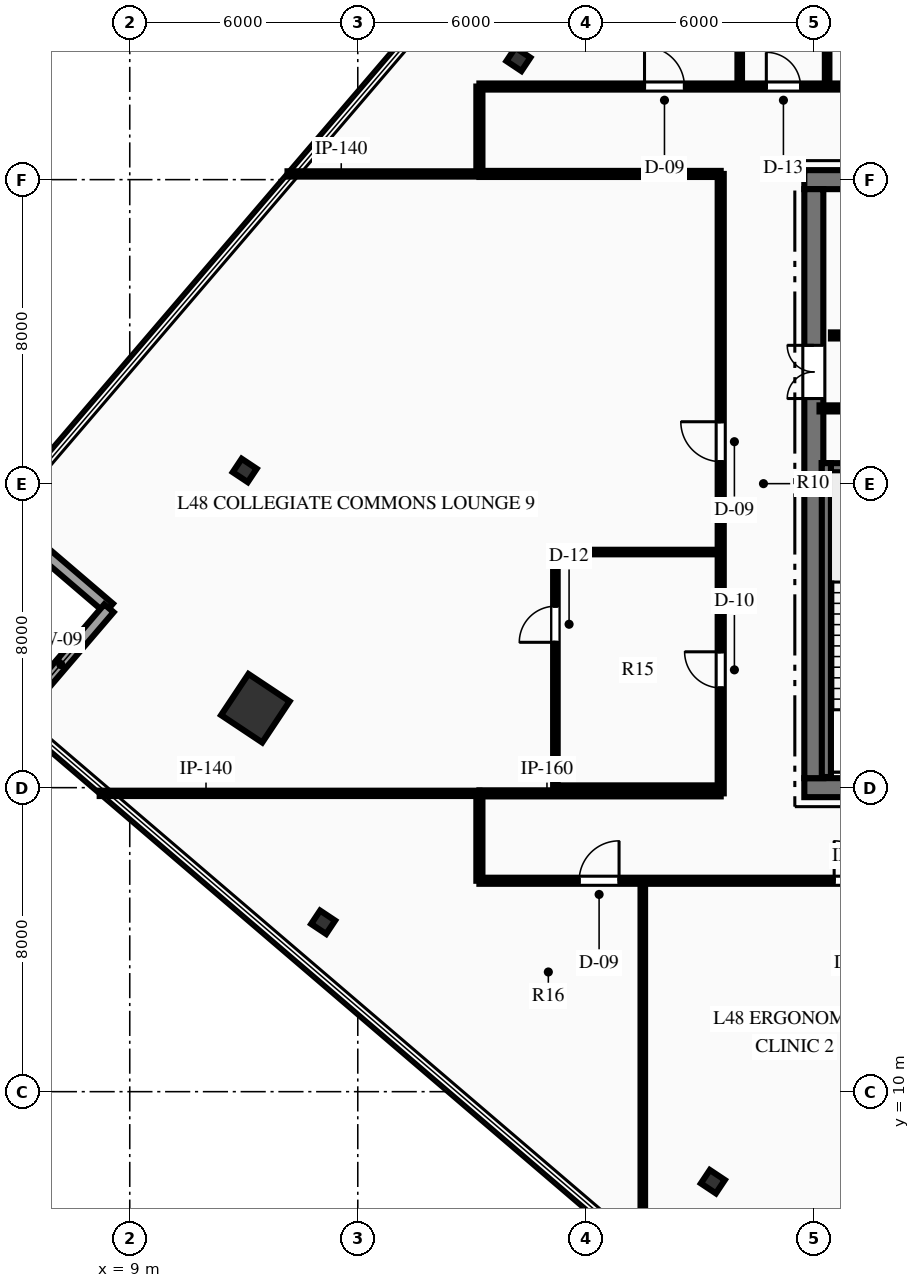
"""IFC4 building model, lengths in metres.
Left out: names, types, materials, properties, quantities, classifications, styles, units other than length and angle.
Written with IfcOpenShell. Run it as: python <this file> out.ifc"""

import sys

from ifc_helpers import new_model, si_unit, direction, frame, frame_2d, origin, origin_2d, place, context, subcontext, project, spatial, rectangle, hollow_rectangle, i_section, extrude, element, fill, save


model = new_model("IFC4")
c1 = context("Model", 3, precision=1e-05, world=origin(), true_north=direction((0.0, 1.0)))
c2 = subcontext(c1, "Body", "Model", "MODEL_VIEW")
j1 = project(units=[si_unit("LENGTHUNIT", "METRE"), si_unit("PLANEANGLEUNIT", "RADIAN")], contexts=[c1])
p1 = place(None, origin())
s1 = spatial("IfcSite", under=j1, at=p1, CompositionType="ELEMENT")
p2 = place(p1, origin())
s2 = spatial("IfcBuilding", under=s1, at=p2, CompositionType="ELEMENT")
p3 = place(p2, frame((0.0, 0.0, 193.95)))
s3 = spatial("IfcBuildingStorey", under=s2, at=p3, CompositionType="ELEMENT", Elevation=193.95)
p4 = place(p3, frame((26.75, 18.0, 0.0), z_axis=(0.0, 0.0, 1.0), x_axis=(1.0, 0.0, 0.0)))
e1 = element("IfcWall", 1, at=p4, inside=s3, PredefinedType="SHEAR", context=c2, shape_type="SweptSolid", body=[
    extrude(rectangle(XDim=18.5, YDim=0.5, at=frame_2d((9.25, 0.0))), origin(), (0.0, 0.0, 1.0), 4.5),
])
p5 = place(p4, frame((7.35, 0.0, 0.0)))
e2 = element("IfcOpeningElement", 2, at=p5, cuts=e1, PredefinedType="OPENING", context=c2, shape_type="SweptSolid", body=[
    extrude(rectangle(XDim=1.1, YDim=2.15, at=frame_2d((0.55, 1.075))), frame((0.0, 0.26, 0.0), z_axis=(0.0, -1.0, 0.0), x_axis=(1.0, 0.0, 0.0)), (0.0, 0.0, 1.0), 0.52),
])
p6 = place(p4, frame((10.05, 0.0, 0.0)))
e3 = element("IfcOpeningElement", 3, at=p6, cuts=e1, PredefinedType="OPENING", context=c2, shape_type="SweptSolid", body=[
    extrude(rectangle(XDim=1.1, YDim=2.15, at=frame_2d((0.55, 1.075))), frame((0.0, 0.26, 0.0), z_axis=(0.0, -1.0, 0.0), x_axis=(1.0, 0.0, 0.0)), (0.0, 0.0, 1.0), 0.52),
])
p7 = place(p3, frame((26.75, 34.0, 0.0), z_axis=(0.0, 0.0, 1.0), x_axis=(1.0, 0.0, 0.0)))
e4 = element("IfcWall", 4, at=p7, inside=s3, PredefinedType="SHEAR", context=c2, shape_type="SweptSolid", body=[
    extrude(rectangle(XDim=18.5, YDim=0.5, at=frame_2d((9.25, 0.0))), origin(), (0.0, 0.0, 1.0), 4.5),
])
p8 = place(p7, frame((13.935, 0.0, 0.0)))
e5 = element("IfcOpeningElement", 5, at=p8, cuts=e4, PredefinedType="OPENING", context=c2, shape_type="SweptSolid", body=[
    extrude(rectangle(XDim=1.1, YDim=2.15, at=frame_2d((0.55, 1.075))), frame((0.0, 0.26, 0.0), z_axis=(0.0, -1.0, 0.0), x_axis=(1.0, 0.0, 0.0)), (0.0, 0.0, 1.0), 0.52),
])
p9 = place(p7, frame((16.185, 0.0, 0.0)))
e6 = element("IfcOpeningElement", 6, at=p9, cuts=e4, PredefinedType="OPENING", context=c2, shape_type="SweptSolid", body=[
    extrude(rectangle(XDim=1.1, YDim=2.15, at=frame_2d((0.55, 1.075))), frame((0.0, 0.26, 0.0), z_axis=(0.0, -1.0, 0.0), x_axis=(1.0, 0.0, 0.0)), (0.0, 0.0, 1.0), 0.52),
])
p10 = place(p3, frame((27.0, 18.25, 0.0), z_axis=(0.0, 0.0, 1.0), x_axis=(0.0, 1.0, 0.0)))
e7 = element("IfcWall", 7, at=p10, inside=s3, PredefinedType="SHEAR", context=c2, shape_type="SweptSolid", body=[
    extrude(rectangle(XDim=15.5, YDim=0.5, at=frame_2d((7.75, 0.0))), origin(), (0.0, 0.0, 1.0), 4.5),
])
p11 = place(p10, frame((9.99, 0.0, 0.0)))
e8 = element("IfcOpeningElement", 8, at=p11, cuts=e7, PredefinedType="OPENING", context=c2, shape_type="SweptSolid", body=[
    extrude(rectangle(XDim=1.4, YDim=2.2, at=frame_2d((0.7, 1.1))), frame((0.0, 0.26, 0.0), z_axis=(0.0, -1.0, 0.0), x_axis=(1.0, 0.0, 0.0)), (0.0, 0.0, 1.0), 0.52),
])
p12 = place(p3, frame((27.21, 26.42, 0.0), z_axis=(0.0, 0.0, 1.0), x_axis=(1.0, 0.0, 0.0)))
e9 = element("IfcWall", 9, at=p12, inside=s3, PredefinedType="SHEAR", context=c2, shape_type="SweptSolid", body=[
    extrude(rectangle(XDim=3.98, YDim=0.24, at=frame_2d((1.99, 0.0))), origin(), (0.0, 0.0, 1.0), 4.5),
])
p13 = place(p3, frame((27.33, 18.28, 0.0), z_axis=(0.0, 0.0, 1.0), x_axis=(0.0, 1.0, 0.0)))
e10 = element("IfcWall", 10, at=p13, inside=s3, PredefinedType="SHEAR", context=c2, shape_type="SweptSolid", body=[
    extrude(rectangle(XDim=8.26, YDim=0.24, at=frame_2d((4.13, 0.0))), origin(), (0.0, 0.0, 1.0), 4.5),
])
p14 = place(p3, frame((12.305, 20.09, 0.0), z_axis=(0.0, 0.0, 1.0), x_axis=(0.554118199338, 0.832437998389, 0.0)))
e11 = element("IfcColumn", 11, at=p14, inside=s3, PredefinedType="COLUMN", context=c2, shape_type="SweptSolid", body=[
    extrude(hollow_rectangle(XDim=1.3, YDim=1.3, WallThickness=0.06, at=origin_2d()), origin(), (0.0, 0.0, 1.0), 4.5),
])
for number, where, z_axis, x_axis in (
    (12, (19.226, 37.166, 0.0), (0.0, 0.0, 1.0), (0.554, 0.832, 0.0)),
    (13, (12.025, 26.347, 0.0), (0.0, 0.0, 1.0), (0.554, 0.832, 0.0)),
    (14, (14.088, 14.458, 0.0), (0.0, 0.0, 1.0), (0.554, 0.832, 0.0)),
    (15, (24.343, 7.631, 0.0), (0.0, 0.0, 1.0), (0.554, 0.832, 0.0)),
):
    element("IfcColumn", number, at=place(p3, frame(where, z_axis=z_axis, x_axis=x_axis)), inside=s3, PredefinedType="COLUMN", context=c2, shape_type="SweptSolid", body=[
        extrude(i_section(OverallWidth=0.424, OverallDepth=0.474, WebThickness=0.048, FlangeThickness=0.077, at=origin_2d()), origin(), (0.0, 0.0, 1.0), 4.5),
    ])
p15 = place(p3, frame((8.453, 22.721, 0.0), z_axis=(0.0, 0.0, 1.0), x_axis=(-0.759844000319, 0.650105449276, 0.0)))
e16 = element("IfcWall", 16, at=p15, inside=s3, PredefinedType="STANDARD", context=c2, shape_type="SweptSolid", body=[
    extrude(rectangle(XDim=3.9, YDim=0.32, at=frame_2d((1.95, 0.0))), origin(), (0.0, 0.0, 1.0), 4.22),
])
p16 = place(p3, frame((5.917, 19.758, 0.0), z_axis=(0.0, 0.0, 1.0), x_axis=(0.650141590235, 0.759813077438, 0.0)))
e17 = element("IfcWall", 17, at=p16, inside=s3, PredefinedType="STANDARD", context=c2, shape_type="SweptSolid", body=[
    extrude(rectangle(XDim=3.9, YDim=0.32, at=frame_2d((1.95, 0.0))), origin(), (0.0, 0.0, 1.0), 4.22),
])
p17 = place(p16, frame((1.1, 0.0, 0.75)))
e18 = element("IfcOpeningElement", 18, at=p17, cuts=e17, PredefinedType="OPENING", context=c2, shape_type="SweptSolid", body=[
    extrude(rectangle(XDim=1.7, YDim=2.5, at=frame_2d((0.85, 1.25))), frame((0.0, 0.17, 0.0), z_axis=(0.0, -1.0, 0.0), x_axis=(1.0, 0.0, 0.0)), (0.0, 0.0, 1.0), 0.34),
])
p18 = place(p3, frame((27.15, 27.98, 0.0), z_axis=(0.0, 0.0, 1.0), x_axis=(1.0, 0.0, 0.0)))
e19 = element("IfcWall", 19, at=p18, inside=s3, PredefinedType="PARTITIONING", context=c2, shape_type="SweptSolid", body=[
    extrude(rectangle(XDim=4.05, YDim=0.16, at=frame_2d((2.025, 0.0))), origin(), (0.0, 0.0, 1.0), 4.22),
])
p19 = place(p18, frame((1.625, 0.0, 0.0)))
e20 = element("IfcOpeningElement", 20, at=p19, cuts=e19, PredefinedType="OPENING", context=c2, shape_type="SweptSolid", body=[
    extrude(rectangle(XDim=0.95, YDim=2.15, at=frame_2d((0.475, 1.075))), frame((0.0, 0.09, 0.0), z_axis=(0.0, -1.0, 0.0), x_axis=(1.0, 0.0, 0.0)), (0.0, 0.0, 1.0), 0.18),
])
p20 = place(p3, frame((27.45, 29.9, 0.0), z_axis=(0.0, 0.0, 1.0), x_axis=(1.0, 0.0, 0.0)))
e21 = element("IfcWall", 21, at=p20, inside=s3, PredefinedType="PARTITIONING", context=c2, shape_type="SweptSolid", body=[
    extrude(rectangle(XDim=4.43, YDim=0.16, at=frame_2d((2.215, 0.0))), origin(), (0.0, 0.0, 1.0), 4.22),
])
p21 = place(p20, frame((1.675, 0.0, 0.0)))
e22 = element("IfcOpeningElement", 22, at=p21, cuts=e21, PredefinedType="OPENING", context=c2, shape_type="SweptSolid", body=[
    extrude(rectangle(XDim=0.95, YDim=2.15, at=frame_2d((0.475, 1.075))), frame((0.0, 0.09, 0.0), z_axis=(0.0, -1.0, 0.0), x_axis=(1.0, 0.0, 0.0)), (0.0, 0.0, 1.0), 0.18),
])
p22 = place(p3, frame((18.2, 15.55, 0.0), z_axis=(0.0, 0.0, 1.0), x_axis=(1.0, 0.0, 0.0)))
e23 = element("IfcWall", 23, at=p22, inside=s3, PredefinedType="PARTITIONING", context=c2, shape_type="SweptSolid", body=[
    extrude(rectangle(XDim=35.6, YDim=0.16, at=frame_2d((17.8, 0.0))), origin(), (0.0, 0.0, 1.0), 3.599),
])
p23 = place(p22, frame((2.625, 0.0, 0.0)))
e24 = element("IfcOpeningElement", 24, at=p23, cuts=e23, PredefinedType="OPENING", context=c2, shape_type="SweptSolid", body=[
    extrude(rectangle(XDim=1.05, YDim=2.15, at=frame_2d((0.525, 1.075))), frame((0.0, 0.09, 0.0), z_axis=(0.0, -1.0, 0.0), x_axis=(1.0, 0.0, 0.0)), (0.0, 0.0, 1.0), 0.18),
])
p24 = place(p22, frame((9.335, 0.0, 0.0)))
e25 = element("IfcOpeningElement", 25, at=p24, cuts=e23, PredefinedType="OPENING", context=c2, shape_type="SweptSolid", body=[
    extrude(rectangle(XDim=1.05, YDim=2.15, at=frame_2d((0.525, 1.075))), frame((0.0, 0.09, 0.0), z_axis=(0.0, -1.0, 0.0), x_axis=(1.0, 0.0, 0.0)), (0.0, 0.0, 1.0), 0.18),
])
p25 = place(p22, frame((17.775, 0.0, 0.0)))
e26 = element("IfcOpeningElement", 26, at=p25, cuts=e23, PredefinedType="OPENING", context=c2, shape_type="SweptSolid", body=[
    extrude(rectangle(XDim=1.05, YDim=2.15, at=frame_2d((0.525, 1.075))), frame((0.0, 0.09, 0.0), z_axis=(0.0, -1.0, 0.0), x_axis=(1.0, 0.0, 0.0)), (0.0, 0.0, 1.0), 0.18),
])
p26 = place(p22, frame((26.055, 0.0, 0.0)))
e27 = element("IfcOpeningElement", 27, at=p26, cuts=e23, PredefinedType="OPENING", context=c2, shape_type="SweptSolid", body=[
    extrude(rectangle(XDim=1.05, YDim=2.15, at=frame_2d((0.525, 1.075))), frame((0.0, 0.09, 0.0), z_axis=(0.0, -1.0, 0.0), x_axis=(1.0, 0.0, 0.0)), (0.0, 0.0, 1.0), 0.18),
])
p27 = place(p22, frame((32.265, 0.0, 0.0)))
e28 = element("IfcOpeningElement", 28, at=p27, cuts=e23, PredefinedType="OPENING", context=c2, shape_type="SweptSolid", body=[
    extrude(rectangle(XDim=1.05, YDim=2.15, at=frame_2d((0.525, 1.075))), frame((0.0, 0.09, 0.0), z_axis=(0.0, -1.0, 0.0), x_axis=(1.0, 0.0, 0.0)), (0.0, 0.0, 1.0), 0.18),
])
p28 = place(p3, frame((18.2, 17.85, 0.0), z_axis=(0.0, 0.0, 1.0), x_axis=(1.0, 0.0, 0.0)))
e29 = element("IfcWall", 29, at=p28, inside=s3, PredefinedType="PARTITIONING", context=c2, shape_type="SweptSolid", body=[
    extrude(rectangle(XDim=6.35, YDim=0.16, at=frame_2d((3.175, 0.0))), origin(), (0.0, 0.0, 1.0), 4.22),
])
p29 = place(p3, frame((18.2, 36.45, 0.0), z_axis=(0.0, 0.0, 1.0), x_axis=(1.0, 0.0, 0.0)))
e30 = element("IfcWall", 30, at=p29, inside=s3, PredefinedType="PARTITIONING", context=c2, shape_type="SweptSolid", body=[
    extrude(rectangle(XDim=35.6, YDim=0.16, at=frame_2d((17.8, 0.0))), origin(), (0.0, 0.0, 1.0), 3.599),
])
p30 = place(p29, frame((7.55, 0.0, 0.0)))
e31 = element("IfcOpeningElement", 31, at=p30, cuts=e30, PredefinedType="OPENING", context=c2, shape_type="SweptSolid", body=[
    extrude(rectangle(XDim=0.9, YDim=2.15, at=frame_2d((0.45, 1.075))), frame((0.0, 0.09, 0.0), z_axis=(0.0, -1.0, 0.0), x_axis=(1.0, 0.0, 0.0)), (0.0, 0.0, 1.0), 0.18),
])
p31 = place(p29, frame((9.85, 0.0, 0.0)))
e32 = element("IfcOpeningElement", 32, at=p31, cuts=e30, PredefinedType="OPENING", context=c2, shape_type="SweptSolid", body=[
    extrude(rectangle(XDim=0.9, YDim=2.15, at=frame_2d((0.45, 1.075))), frame((0.0, 0.09, 0.0), z_axis=(0.0, -1.0, 0.0), x_axis=(1.0, 0.0, 0.0)), (0.0, 0.0, 1.0), 0.18),
])
p32 = place(p29, frame((12.1, 0.0, 0.0)))
e33 = element("IfcOpeningElement", 33, at=p32, cuts=e30, PredefinedType="OPENING", context=c2, shape_type="SweptSolid", body=[
    extrude(rectangle(XDim=1.0, YDim=2.15, at=frame_2d((0.5, 1.075))), frame((0.0, 0.09, 0.0), z_axis=(0.0, -1.0, 0.0), x_axis=(1.0, 0.0, 0.0)), (0.0, 0.0, 1.0), 0.18),
])
p33 = place(p29, frame((4.345, 0.0, 0.0)))
e34 = element("IfcOpeningElement", 34, at=p33, cuts=e30, PredefinedType="OPENING", context=c2, shape_type="SweptSolid", body=[
    extrude(rectangle(XDim=1.05, YDim=2.15, at=frame_2d((0.525, 1.075))), frame((0.0, 0.09, 0.0), z_axis=(0.0, -1.0, 0.0), x_axis=(1.0, 0.0, 0.0)), (0.0, 0.0, 1.0), 0.18),
])
p34 = place(p29, frame((18.049, 0.0, 0.0)))
e35 = element("IfcOpeningElement", 35, at=p34, cuts=e30, PredefinedType="OPENING", context=c2, shape_type="SweptSolid", body=[
    extrude(rectangle(XDim=1.05, YDim=2.15, at=frame_2d((0.525, 1.075))), frame((0.0, 0.09, 0.0), z_axis=(0.0, -1.0, 0.0), x_axis=(1.0, 0.0, 0.0)), (0.0, 0.0, 1.0), 0.18),
])
p35 = place(p29, frame((31.833, 0.0, 0.0)))
e36 = element("IfcOpeningElement", 36, at=p35, cuts=e30, PredefinedType="OPENING", context=c2, shape_type="SweptSolid", body=[
    extrude(rectangle(XDim=1.05, YDim=2.15, at=frame_2d((0.525, 1.075))), frame((0.0, 0.09, 0.0), z_axis=(0.0, -1.0, 0.0), x_axis=(1.0, 0.0, 0.0)), (0.0, 0.0, 1.0), 0.18),
])
p36 = place(p3, frame((18.2, 34.15, 0.0), z_axis=(0.0, 0.0, 1.0), x_axis=(1.0, 0.0, 0.0)))
e37 = element("IfcWall", 37, at=p36, inside=s3, PredefinedType="PARTITIONING", context=c2, shape_type="SweptSolid", body=[
    extrude(rectangle(XDim=6.35, YDim=0.16, at=frame_2d((3.175, 0.0))), origin(), (0.0, 0.0, 1.0), 4.22),
])
p37 = place(p3, frame((24.55, 17.85, 0.0), z_axis=(0.0, 0.0, 1.0), x_axis=(0.0, 1.0, 0.0)))
e38 = element("IfcWall", 38, at=p37, inside=s3, PredefinedType="PARTITIONING", context=c2, shape_type="SweptSolid", body=[
    extrude(rectangle(XDim=16.3, YDim=0.16, at=frame_2d((8.15, 0.0))), origin(), (0.0, 0.0, 1.0), 4.22),
])
p38 = place(p37, frame((2.775, 0.0, 0.0)))
e39 = element("IfcOpeningElement", 39, at=p38, cuts=e38, PredefinedType="OPENING", context=c2, shape_type="SweptSolid", body=[
    extrude(rectangle(XDim=0.95, YDim=2.15, at=frame_2d((0.475, 1.075))), frame((0.0, 0.09, 0.0), z_axis=(0.0, -1.0, 0.0), x_axis=(1.0, 0.0, 0.0)), (0.0, 0.0, 1.0), 0.18),
])
p39 = place(p37, frame((8.729, 0.0, 0.0)))
e40 = element("IfcOpeningElement", 40, at=p39, cuts=e38, PredefinedType="OPENING", context=c2, shape_type="SweptSolid", body=[
    extrude(rectangle(XDim=1.05, YDim=2.15, at=frame_2d((0.525, 1.075))), frame((0.0, 0.09, 0.0), z_axis=(0.0, -1.0, 0.0), x_axis=(1.0, 0.0, 0.0)), (0.0, 0.0, 1.0), 0.18),
])
for number, where, z_axis, x_axis in (
    (41, (18.2, 15.55, 0.0), (0.0, 0.0, 1.0), (0.0, 1.0, 0.0)),
    (42, (18.2, 34.15, 0.0), (0.0, 0.0, 1.0), (0.0, 1.0, 0.0)),
):
    element("IfcWall", number, at=place(p3, frame(where, z_axis=z_axis, x_axis=x_axis)), inside=s3, PredefinedType="PARTITIONING", context=c2, shape_type="SweptSolid", body=[
        extrude(rectangle(XDim=2.3, YDim=0.16, at=frame_2d((1.15, 0.0))), origin(), (0.0, 0.0, 1.0), 4.22),
    ])
for number, where, z_axis, x_axis in (
    (43, (25.05, 36.45, 0.0), (0.0, 0.0, 1.0), (0.0, 1.0, 0.0)),
    (44, (27.35, 36.45, 0.0), (0.0, 0.0, 1.0), (0.0, 1.0, 0.0)),
):
    element("IfcWall", number, at=place(p3, frame(where, z_axis=z_axis, x_axis=x_axis)), inside=s3, PredefinedType="PARTITIONING", context=c2, shape_type="SweptSolid", body=[
        extrude(rectangle(XDim=3.9, YDim=0.12, at=frame_2d((1.95, 0.0))), origin(), (0.0, 0.0, 1.0), 4.22),
    ])
p40 = place(p3, frame((8.209, 17.85, 0.0), z_axis=(0.0, 0.0, 1.0), x_axis=(1.0, 0.0, 0.0)))
e45 = element("IfcWall", 45, at=p40, inside=s3, PredefinedType="PARTITIONING", context=c2, shape_type="SweptSolid", body=[
    extrude(rectangle(XDim=9.991, YDim=0.14, at=frame_2d((4.996, 0.0))), origin(), (0.0, 0.0, 1.0), 4.22),
])
p41 = place(p3, frame((13.151, 34.15, 0.0), z_axis=(0.0, 0.0, 1.0), x_axis=(1.0, 0.0, 0.0)))
e46 = element("IfcWall", 46, at=p41, inside=s3, PredefinedType="PARTITIONING", context=c2, shape_type="SweptSolid", body=[
    extrude(rectangle(XDim=5.049, YDim=0.14, at=frame_2d((2.524, 0.0))), origin(), (0.0, 0.0, 1.0), 4.22),
])
p42 = place(p3, frame((22.5, 5.623, 0.0), z_axis=(0.0, 0.0, 1.0), x_axis=(0.0, 1.0, 0.0)))
e47 = element("IfcWall", 47, at=p42, inside=s3, PredefinedType="PARTITIONING", context=c2, shape_type="SweptSolid", body=[
    extrude(rectangle(XDim=9.927, YDim=0.12, at=frame_2d((4.964, 0.0))), origin(), (0.0, 0.0, 1.0), 4.22),
])
p43 = place(p3, frame((20.2, 18.0, 0.0), z_axis=(0.0, 0.0, 1.0), x_axis=(1.0, 0.0, 0.0)))
e48 = element("IfcWall", 48, at=p43, inside=s3, PredefinedType="PARTITIONING", context=c2, shape_type="SweptSolid", body=[
    extrude(rectangle(XDim=4.35, YDim=0.12, at=frame_2d((2.175, 0.0))), origin(), (0.0, 0.0, 1.0), 4.22),
])
p44 = place(p3, frame((20.2, 18.0, 0.0), z_axis=(0.0, 0.0, 1.0), x_axis=(0.0, 1.0, 0.0)))
e49 = element("IfcWall", 49, at=p44, inside=s3, PredefinedType="PARTITIONING", context=c2, shape_type="SweptSolid", body=[
    extrude(rectangle(XDim=6.2, YDim=0.12, at=frame_2d((3.1, 0.0))), origin(), (0.0, 0.0, 1.0), 4.22),
])
p45 = place(p44, frame((3.825, 0.0, 0.0)))
e50 = element("IfcOpeningElement", 50, at=p45, cuts=e49, PredefinedType="OPENING", context=c2, shape_type="SweptSolid", body=[
    extrude(rectangle(XDim=0.95, YDim=2.15, at=frame_2d((0.475, 1.075))), frame((0.0, 0.07, 0.0), z_axis=(0.0, -1.0, 0.0), x_axis=(1.0, 0.0, 0.0)), (0.0, 0.0, 1.0), 0.14),
])
p46 = place(p3, frame((20.2, 24.2, 0.0), z_axis=(0.0, 0.0, 1.0), x_axis=(1.0, 0.0, 0.0)))
e51 = element("IfcWall", 51, at=p46, inside=s3, PredefinedType="PARTITIONING", context=c2, shape_type="SweptSolid", body=[
    extrude(rectangle(XDim=4.35, YDim=0.12, at=frame_2d((2.175, 0.0))), origin(), (0.0, 0.0, 1.0), 4.22),
])
p47 = place(p17, origin())
e52 = element("IfcWindow", 52, at=p47, inside=s3, PartitioningType="SINGLE_PANEL", PredefinedType="WINDOW", context=c2, shape_type="SweptSolid", body=[
    extrude(rectangle(XDim=1.7, YDim=2.5, at=frame_2d((0.85, 1.25))), frame((0.0, 0.03, 0.0), z_axis=(0.0, -1.0, 0.0), x_axis=(1.0, 0.0, 0.0)), (0.0, 0.0, 1.0), 0.06),
])
fill(e18, e52)
p48 = place(p11, origin())
e53 = element("IfcDoor", 53, at=p48, inside=s3, OperationType="DOUBLE_DOOR_SINGLE_SWING", PredefinedType="DOOR", context=c2, shape_type="SweptSolid", body=[
    extrude(rectangle(XDim=1.4, YDim=2.2, at=frame_2d((0.7, 1.1))), frame((0.0, 0.025, 0.0), z_axis=(0.0, -1.0, 0.0), x_axis=(1.0, 0.0, 0.0)), (0.0, 0.0, 1.0), 0.05),
])
fill(e8, e53)
p49 = place(p30, origin())
e54 = element("IfcDoor", 54, at=p49, inside=s3, OperationType="SINGLE_SWING_LEFT", PredefinedType="DOOR", context=c2, shape_type="SweptSolid", body=[
    extrude(rectangle(XDim=0.9, YDim=2.15, at=frame_2d((0.45, 1.075))), frame((0.0, 0.025, 0.0), z_axis=(0.0, -1.0, 0.0), x_axis=(1.0, 0.0, 0.0)), (0.0, 0.0, 1.0), 0.05),
])
fill(e31, e54)
p50 = place(p38, origin())
e55 = element("IfcDoor", 55, at=p50, inside=s3, OperationType="SINGLE_SWING_RIGHT", PredefinedType="DOOR", context=c2, shape_type="SweptSolid", body=[
    extrude(rectangle(XDim=0.95, YDim=2.15, at=frame_2d((0.475, 1.075))), frame((0.0, 0.025, 0.0), z_axis=(0.0, -1.0, 0.0), x_axis=(1.0, 0.0, 0.0)), (0.0, 0.0, 1.0), 0.05),
])
fill(e39, e55)
p51 = place(p45, origin())
e56 = element("IfcDoor", 56, at=p51, inside=s3, OperationType="SINGLE_SWING_LEFT", PredefinedType="DOOR", context=c2, shape_type="SweptSolid", body=[
    extrude(rectangle(XDim=0.95, YDim=2.15, at=frame_2d((0.475, 1.075))), frame((0.0, 0.025, 0.0), z_axis=(0.0, -1.0, 0.0), x_axis=(1.0, 0.0, 0.0)), (0.0, 0.0, 1.0), 0.05),
])
fill(e50, e56)
p52 = place(p23, origin())
e57 = element("IfcDoor", 57, at=p52, inside=s3, OperationType="SINGLE_SWING_RIGHT", PredefinedType="DOOR", context=c2, shape_type="SweptSolid", body=[
    extrude(rectangle(XDim=1.05, YDim=2.15, at=frame_2d((0.525, 1.075))), frame((0.0, 0.025, 0.0), z_axis=(0.0, -1.0, 0.0), x_axis=(1.0, 0.0, 0.0)), (0.0, 0.0, 1.0), 0.05),
])
fill(e24, e57)
p53 = place(p24, origin())
e58 = element("IfcDoor", 58, at=p53, inside=s3, OperationType="SINGLE_SWING_LEFT", PredefinedType="DOOR", context=c2, shape_type="SweptSolid", body=[
    extrude(rectangle(XDim=1.05, YDim=2.15, at=frame_2d((0.525, 1.075))), frame((0.0, 0.025, 0.0), z_axis=(0.0, -1.0, 0.0), x_axis=(1.0, 0.0, 0.0)), (0.0, 0.0, 1.0), 0.05),
])
fill(e25, e58)
p54 = place(p33, origin())
e59 = element("IfcDoor", 59, at=p54, inside=s3, OperationType="SINGLE_SWING_LEFT", PredefinedType="DOOR", context=c2, shape_type="SweptSolid", body=[
    extrude(rectangle(XDim=1.05, YDim=2.15, at=frame_2d((0.525, 1.075))), frame((0.0, 0.025, 0.0), z_axis=(0.0, -1.0, 0.0), x_axis=(1.0, 0.0, 0.0)), (0.0, 0.0, 1.0), 0.05),
])
fill(e34, e59)
p55 = place(p39, origin())
e60 = element("IfcDoor", 60, at=p55, inside=s3, OperationType="SINGLE_SWING_RIGHT", PredefinedType="DOOR", context=c2, shape_type="SweptSolid", body=[
    extrude(rectangle(XDim=1.05, YDim=2.15, at=frame_2d((0.525, 1.075))), frame((0.0, 0.025, 0.0), z_axis=(0.0, -1.0, 0.0), x_axis=(1.0, 0.0, 0.0)), (0.0, 0.0, 1.0), 0.05),
])
fill(e40, e60)
save(model, sys.argv[1])
